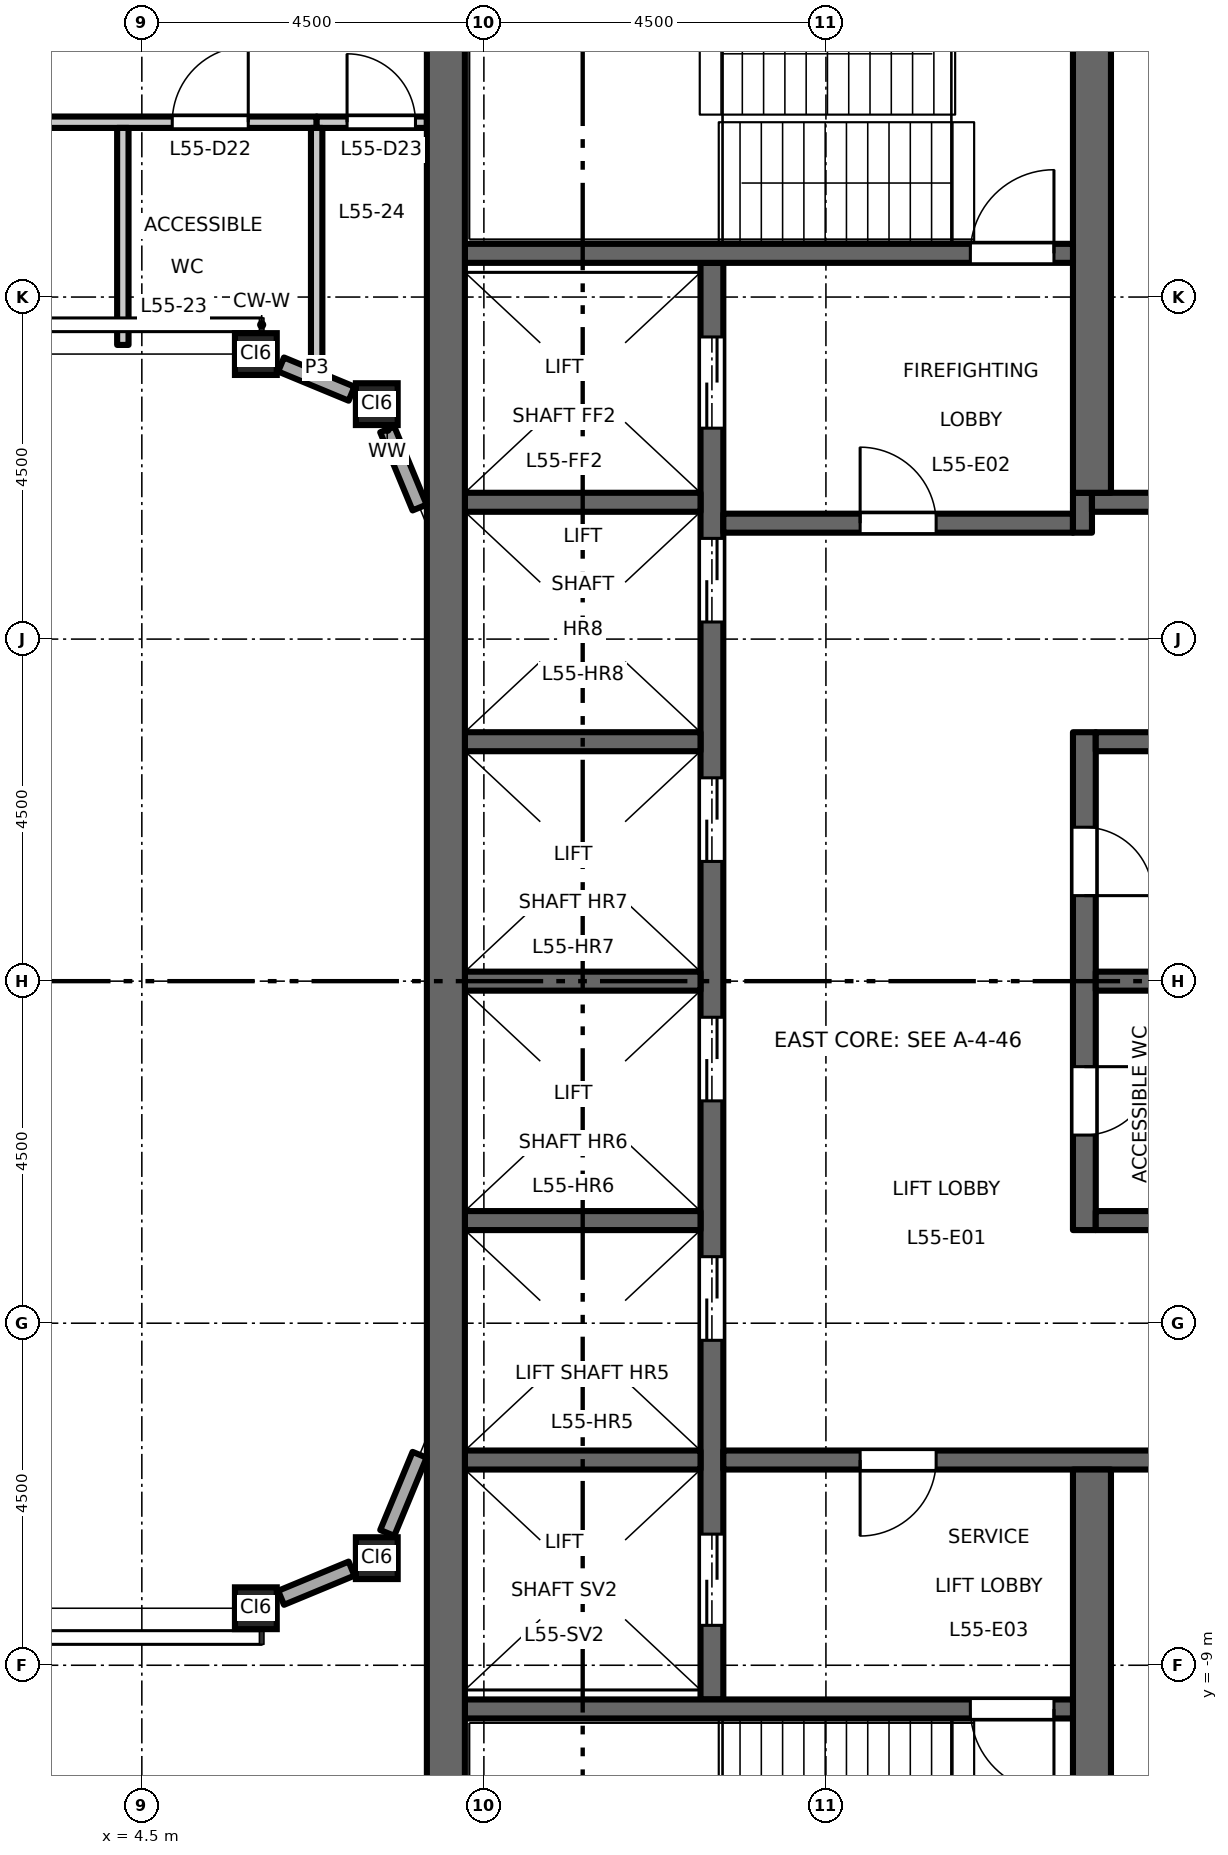
"""IFC4 building model, lengths in metres.
Left out: names, types, materials, properties, quantities, classifications, styles, units other than length and angle.
Written with IfcOpenShell. Run it as: python <this file> out.ifc"""

import sys

from ifc_helpers import new_model, si_unit, direction, frame, frame_2d, origin, origin_2d, place, context, subcontext, project, spatial, rectangle, hollow_rectangle, extrude, element, fill, save


model = new_model("IFC4")
c1 = context("Model", 3, precision=1e-05, world=origin(), true_north=direction((0.0, 1.0)))
c2 = subcontext(c1, "Body", "Model", "MODEL_VIEW")
j1 = project(units=[si_unit("LENGTHUNIT", "METRE"), si_unit("PLANEANGLEUNIT", "RADIAN")], contexts=[c1])
p1 = place(None, origin())
s1 = spatial("IfcSite", under=j1, at=p1, CompositionType="ELEMENT")
p2 = place(p1, origin())
s2 = spatial("IfcBuilding", under=s1, at=p2, CompositionType="ELEMENT")
p3 = place(p2, frame((0.0, 0.0, 255.7)))
s3 = spatial("IfcBuildingStorey", under=s2, at=p3, CompositionType="ELEMENT", Elevation=255.7)
for number, where, z_axis, x_axis in (
    (1, (6.0, -8.25, 0.0), (0.0, 0.0, 1.0), (1.0, 0.0, 0.0)),
    (2, (7.591, -7.591, 0.0), (0.0, 0.0, 1.0), (1.0, 0.0, 0.0)),
    (3, (6.0, 8.25, 0.0), (0.0, 0.0, 1.0), (1.0, 0.0, 0.0)),
    (4, (7.591, 7.591, 0.0), (0.0, 0.0, 1.0), (1.0, 0.0, 0.0)),
):
    element("IfcColumn", number, at=place(p3, frame(where, z_axis=z_axis, x_axis=x_axis)), inside=s3, PredefinedType="COLUMN", context=c2, shape_type="SweptSolid", body=[
        extrude(hollow_rectangle(XDim=0.55, YDim=0.55, WallThickness=0.028, at=origin_2d()), origin(), (0.0, 0.0, 1.0), 4.5),
    ])
p4 = place(p3, frame((12.0, -9.45, 0.0), z_axis=(0.0, 0.0, 1.0), x_axis=(0.0, 1.0, 0.0)))
e5 = element("IfcWall", 5, at=p4, inside=s3, PredefinedType="SHEAR", context=c2, shape_type="SweptSolid", body=[
    extrude(rectangle(XDim=18.9, YDim=0.3, at=frame_2d((9.45, 0.0))), origin(), (0.0, 0.0, 1.0), 4.35),
])
p5 = place(p4, frame((4.725, 0.0, 0.0)))
e6 = element("IfcOpeningElement", 6, at=p5, cuts=e5, PredefinedType="OPENING", context=c2, shape_type="SweptSolid", body=[
    extrude(rectangle(XDim=1.1, YDim=2.1, at=frame_2d((0.55, 1.05))), frame((0.0, 0.16, 0.0), z_axis=(0.0, -1.0, 0.0), x_axis=(1.0, 0.0, 0.0)), (0.0, 0.0, 1.0), 0.32),
])
p6 = place(p4, frame((7.875, 0.0, 0.0)))
e7 = element("IfcOpeningElement", 7, at=p6, cuts=e5, PredefinedType="OPENING", context=c2, shape_type="SweptSolid", body=[
    extrude(rectangle(XDim=1.1, YDim=2.1, at=frame_2d((0.55, 1.05))), frame((0.0, 0.16, 0.0), z_axis=(0.0, -1.0, 0.0), x_axis=(1.0, 0.0, 0.0)), (0.0, 0.0, 1.0), 0.32),
])
p7 = place(p4, frame((11.025, 0.0, 0.0)))
e8 = element("IfcOpeningElement", 8, at=p7, cuts=e5, PredefinedType="OPENING", context=c2, shape_type="SweptSolid", body=[
    extrude(rectangle(XDim=1.1, YDim=2.1, at=frame_2d((0.55, 1.05))), frame((0.0, 0.16, 0.0), z_axis=(0.0, -1.0, 0.0), x_axis=(1.0, 0.0, 0.0)), (0.0, 0.0, 1.0), 0.32),
])
p8 = place(p4, frame((14.175, 0.0, 0.0)))
e9 = element("IfcOpeningElement", 9, at=p8, cuts=e5, PredefinedType="OPENING", context=c2, shape_type="SweptSolid", body=[
    extrude(rectangle(XDim=1.1, YDim=2.1, at=frame_2d((0.55, 1.05))), frame((0.0, 0.16, 0.0), z_axis=(0.0, -1.0, 0.0), x_axis=(1.0, 0.0, 0.0)), (0.0, 0.0, 1.0), 0.32),
])
p9 = place(p4, frame((16.725, 0.0, 0.0)))
e10 = element("IfcOpeningElement", 10, at=p9, cuts=e5, PredefinedType="OPENING", context=c2, shape_type="SweptSolid", body=[
    extrude(rectangle(XDim=1.2, YDim=2.1, at=frame_2d((0.6, 1.05))), frame((0.0, 0.16, 0.0), z_axis=(0.0, -1.0, 0.0), x_axis=(1.0, 0.0, 0.0)), (0.0, 0.0, 1.0), 0.32),
])
p10 = place(p4, frame((0.975, 0.0, 0.0)))
e11 = element("IfcOpeningElement", 11, at=p10, cuts=e5, PredefinedType="OPENING", context=c2, shape_type="SweptSolid", body=[
    extrude(rectangle(XDim=1.2, YDim=2.1, at=frame_2d((0.6, 1.05))), frame((0.0, 0.16, 0.0), z_axis=(0.0, -1.0, 0.0), x_axis=(1.0, 0.0, 0.0)), (0.0, 0.0, 1.0), 0.32),
])
p11 = place(p3, frame((12.15, 6.025, 0.0), z_axis=(0.0, 0.0, 1.0), x_axis=(1.0, 0.0, 0.0)))
e12 = element("IfcWall", 12, at=p11, inside=s3, PredefinedType="SHEAR", context=c2, shape_type="SweptSolid", body=[
    extrude(rectangle(XDim=4.6, YDim=0.25, at=frame_2d((2.3, 0.0))), origin(), (0.0, 0.0, 1.0), 4.35),
])
p12 = place(p11, frame((1.8, 0.0, 0.0)))
e13 = element("IfcOpeningElement", 13, at=p12, cuts=e12, PredefinedType="OPENING", context=c2, shape_type="SweptSolid", body=[
    extrude(rectangle(XDim=1.0, YDim=2.1, at=frame_2d((0.5, 1.05))), frame((0.0, 0.135, 0.0), z_axis=(0.0, -1.0, 0.0), x_axis=(1.0, 0.0, 0.0)), (0.0, 0.0, 1.0), 0.27),
])
p13 = place(p3, frame((16.875, 5.9, 0.0), z_axis=(0.0, 0.0, 1.0), x_axis=(0.0, 1.0, 0.0)))
e14 = element("IfcWall", 14, at=p13, inside=s3, PredefinedType="SHEAR", context=c2, shape_type="SweptSolid", body=[
    extrude(rectangle(XDim=0.525, YDim=0.25, at=frame_2d((0.263, 0.0))), origin(), (0.0, 0.0, 1.0), 4.35),
])
p14 = place(p3, frame((17.0, 6.3, 0.0), z_axis=(0.0, 0.0, 1.0), x_axis=(1.0, 0.0, 0.0)))
e15 = element("IfcWall", 15, at=p14, inside=s3, PredefinedType="SHEAR", context=c2, shape_type="SweptSolid", body=[
    extrude(rectangle(XDim=4.25, YDim=0.25, at=frame_2d((2.125, 0.0))), origin(), (0.0, 0.0, 1.0), 4.35),
])
p15 = place(p3, frame((12.15, -6.3, 0.0), z_axis=(0.0, 0.0, 1.0), x_axis=(1.0, 0.0, 0.0)))
e16 = element("IfcWall", 16, at=p15, inside=s3, PredefinedType="SHEAR", context=c2, shape_type="SweptSolid", body=[
    extrude(rectangle(XDim=9.1, YDim=0.25, at=frame_2d((4.55, 0.0))), origin(), (0.0, 0.0, 1.0), 4.35),
])
p16 = place(p15, frame((1.8, 0.0, 0.0)))
e17 = element("IfcOpeningElement", 17, at=p16, cuts=e16, PredefinedType="OPENING", context=c2, shape_type="SweptSolid", body=[
    extrude(rectangle(XDim=1.0, YDim=2.1, at=frame_2d((0.5, 1.05))), frame((0.0, 0.135, 0.0), z_axis=(0.0, -1.0, 0.0), x_axis=(1.0, 0.0, 0.0)), (0.0, 0.0, 1.0), 0.27),
])
p17 = place(p3, frame((16.9, -3.275, 0.0), z_axis=(0.0, 0.0, 1.0), x_axis=(0.0, 1.0, 0.0)))
e18 = element("IfcWall", 18, at=p17, inside=s3, PredefinedType="SHEAR", context=c2, shape_type="SweptSolid", body=[
    extrude(rectangle(XDim=6.55, YDim=0.3, at=frame_2d((3.275, 0.0))), origin(), (0.0, 0.0, 1.0), 4.35),
])
p18 = place(p17, frame((1.25, 0.0, 0.0)))
e19 = element("IfcOpeningElement", 19, at=p18, cuts=e18, PredefinedType="OPENING", context=c2, shape_type="SweptSolid", body=[
    extrude(rectangle(XDim=0.9, YDim=2.1, at=frame_2d((0.45, 1.05))), frame((0.0, 0.16, 0.0), z_axis=(0.0, -1.0, 0.0), x_axis=(1.0, 0.0, 0.0)), (0.0, 0.0, 1.0), 0.32),
])
p19 = place(p17, frame((4.4, 0.0, 0.0)))
e20 = element("IfcOpeningElement", 20, at=p19, cuts=e18, PredefinedType="OPENING", context=c2, shape_type="SweptSolid", body=[
    extrude(rectangle(XDim=0.9, YDim=2.1, at=frame_2d((0.45, 1.05))), frame((0.0, 0.16, 0.0), z_axis=(0.0, -1.0, 0.0), x_axis=(1.0, 0.0, 0.0)), (0.0, 0.0, 1.0), 0.32),
])
for number, where, z_axis, x_axis in (
    (21, (17.05, 0.0, 0.0), (0.0, 0.0, 1.0), (1.0, 0.0, 0.0)),
    (22, (17.05, 3.15, 0.0), (0.0, 0.0, 1.0), (1.0, 0.0, 0.0)),
    (23, (17.05, -3.15, 0.0), (0.0, 0.0, 1.0), (1.0, 0.0, 0.0)),
):
    element("IfcWall", number, at=place(p3, frame(where, z_axis=z_axis, x_axis=x_axis)), inside=s3, PredefinedType="SHEAR", context=c2, shape_type="SweptSolid", body=[
        extrude(rectangle(XDim=4.2, YDim=0.25, at=frame_2d((2.1, 0.0))), origin(), (0.0, 0.0, 1.0), 4.35),
    ])
for number, where, z_axis, x_axis in (
    (24, (17.0, 6.425, 0.0), (0.0, 0.0, 1.0), (0.0, 1.0, 0.0)),
    (25, (17.0, -13.0, 0.0), (0.0, 0.0, 1.0), (0.0, 1.0, 0.0)),
):
    element("IfcWall", number, at=place(p3, frame(where, z_axis=z_axis, x_axis=x_axis)), inside=s3, PredefinedType="SHEAR", context=c2, shape_type="SweptSolid", body=[
        extrude(rectangle(XDim=6.575, YDim=0.5, at=frame_2d((3.288, 0.0))), origin(), (0.0, 0.0, 1.0), 4.35),
    ])
for number, where, z_axis, x_axis in (
    (26, (8.75, 0.0, 0.0), (0.0, 0.0, 1.0), (1.0, 0.0, 0.0)),
    (27, (8.75, 3.15, 0.0), (0.0, 0.0, 1.0), (1.0, 0.0, 0.0)),
    (28, (8.75, 6.3, 0.0), (0.0, 0.0, 1.0), (1.0, 0.0, 0.0)),
    (29, (8.75, -3.15, 0.0), (0.0, 0.0, 1.0), (1.0, 0.0, 0.0)),
    (30, (8.75, -6.3, 0.0), (0.0, 0.0, 1.0), (1.0, 0.0, 0.0)),
):
    element("IfcWall", number, at=place(p3, frame(where, z_axis=z_axis, x_axis=x_axis)), inside=s3, PredefinedType="SHEAR", context=c2, shape_type="SweptSolid", body=[
        extrude(rectangle(XDim=3.1, YDim=0.25, at=frame_2d((1.55, 0.0))), origin(), (0.0, 0.0, 1.0), 4.35),
    ])
p20 = place(p3, frame((8.75, 9.575, 0.0), z_axis=(0.0, 0.0, 1.0), x_axis=(1.0, 0.0, 0.0)))
e31 = element("IfcWall", 31, at=p20, inside=s3, PredefinedType="SHEAR", context=c2, shape_type="SweptSolid", body=[
    extrude(rectangle(XDim=8.0, YDim=0.25, at=frame_2d((4.0, 0.0))), origin(), (0.0, 0.0, 1.0), 4.35),
])
p21 = place(p20, frame((6.65, 0.0, 0.0)))
e32 = element("IfcOpeningElement", 32, at=p21, cuts=e31, PredefinedType="OPENING", context=c2, shape_type="SweptSolid", body=[
    extrude(rectangle(XDim=1.1, YDim=2.1, at=frame_2d((0.55, 1.05))), frame((0.0, 0.135, 0.0), z_axis=(0.0, -1.0, 0.0), x_axis=(1.0, 0.0, 0.0)), (0.0, 0.0, 1.0), 0.27),
])
p22 = place(p3, frame((8.75, -9.575, 0.0), z_axis=(0.0, 0.0, 1.0), x_axis=(1.0, 0.0, 0.0)))
e33 = element("IfcWall", 33, at=p22, inside=s3, PredefinedType="SHEAR", context=c2, shape_type="SweptSolid", body=[
    extrude(rectangle(XDim=8.0, YDim=0.25, at=frame_2d((4.0, 0.0))), origin(), (0.0, 0.0, 1.0), 4.35),
])
p23 = place(p22, frame((6.65, 0.0, 0.0)))
e34 = element("IfcOpeningElement", 34, at=p23, cuts=e33, PredefinedType="OPENING", context=c2, shape_type="SweptSolid", body=[
    extrude(rectangle(XDim=1.1, YDim=2.1, at=frame_2d((0.55, 1.05))), frame((0.0, 0.135, 0.0), z_axis=(0.0, -1.0, 0.0), x_axis=(1.0, 0.0, 0.0)), (0.0, 0.0, 1.0), 0.27),
])
p24 = place(p3, frame((8.5, -13.0, 0.0), z_axis=(0.0, 0.0, 1.0), x_axis=(0.0, 1.0, 0.0)))
e35 = element("IfcWall", 35, at=p24, inside=s3, PredefinedType="SHEAR", context=c2, shape_type="SweptSolid", body=[
    extrude(rectangle(XDim=26.0, YDim=0.5, at=frame_2d((13.0, 0.0))), origin(), (0.0, 0.0, 1.0), 4.35),
])
p25 = place(p3, frame((6.332, -8.113, 0.0), z_axis=(0.0, 0.0, 1.0), x_axis=(0.923859650767, 0.382731427616, 0.0)))
e36 = element("IfcWall", 36, at=p25, inside=s3, PredefinedType="STANDARD", context=c2, shape_type="SweptSolid", body=[
    extrude(rectangle(XDim=1.003, YDim=0.2, at=frame_2d((0.502, 0.0))), origin(), (0.0, 0.0, 1.0), 3.918),
])
for number, where, z_axis, x_axis in (
    (37, (7.729, -7.259, 0.0), (0.0, 0.0, 1.0), (0.383, 0.924, 0.0)),
    (38, (8.154, 6.231, 0.0), (0.0, 0.0, 1.0), (-0.383, 0.924, 0.0)),
):
    element("IfcWall", number, at=place(p3, frame(where, z_axis=z_axis, x_axis=x_axis)), inside=s3, PredefinedType="STANDARD", context=c2, shape_type="SweptSolid", body=[
        extrude(rectangle(XDim=1.113, YDim=0.2, at=frame_2d((0.556, 0.0))), origin(), (0.0, 0.0, 1.0), 3.918),
    ])
p26 = place(p3, frame((7.259, 7.729, 0.0), z_axis=(0.0, 0.0, 1.0), x_axis=(-0.923859650767, 0.382731427616, 0.0)))
e39 = element("IfcWall", 39, at=p26, inside=s3, PredefinedType="STANDARD", context=c2, shape_type="SweptSolid", body=[
    extrude(rectangle(XDim=1.003, YDim=0.2, at=frame_2d((0.502, 0.0))), origin(), (0.0, 0.0, 1.0), 3.918),
])
p27 = place(p3, frame((-8.25, 11.3, 0.0), z_axis=(0.0, 0.0, 1.0), x_axis=(1.0, 0.0, 0.0)))
e40 = element("IfcWall", 40, at=p27, inside=s3, PredefinedType="PARTITIONING", context=c2, shape_type="SweptSolid", body=[
    extrude(rectangle(XDim=15.05, YDim=0.15, at=frame_2d((7.525, 0.0))), origin(), (0.0, 0.0, 1.0), 4.35),
])
p28 = place(p27, frame((4.65, 0.0, 0.0)))
e41 = element("IfcOpeningElement", 41, at=p28, cuts=e40, PredefinedType="OPENING", context=c2, shape_type="SweptSolid", body=[
    extrude(rectangle(XDim=1.0, YDim=2.1, at=frame_2d((0.5, 1.05))), frame((0.0, 0.085, 0.0), z_axis=(0.0, -1.0, 0.0), x_axis=(1.0, 0.0, 0.0)), (0.0, 0.0, 1.0), 0.17),
])
p29 = place(p27, frame((6.9, 0.0, 0.0)))
e42 = element("IfcOpeningElement", 42, at=p29, cuts=e40, PredefinedType="OPENING", context=c2, shape_type="SweptSolid", body=[
    extrude(rectangle(XDim=1.0, YDim=2.1, at=frame_2d((0.5, 1.05))), frame((0.0, 0.085, 0.0), z_axis=(0.0, -1.0, 0.0), x_axis=(1.0, 0.0, 0.0)), (0.0, 0.0, 1.0), 0.17),
])
p30 = place(p27, frame((13.15, 0.0, 0.0)))
e43 = element("IfcOpeningElement", 43, at=p30, cuts=e40, PredefinedType="OPENING", context=c2, shape_type="SweptSolid", body=[
    extrude(rectangle(XDim=1.0, YDim=2.1, at=frame_2d((0.5, 1.05))), frame((0.0, 0.085, 0.0), z_axis=(0.0, -1.0, 0.0), x_axis=(1.0, 0.0, 0.0)), (0.0, 0.0, 1.0), 0.17),
])
p31 = place(p3, frame((6.8, 11.3, 0.0), z_axis=(0.0, 0.0, 1.0), x_axis=(1.0, 0.0, 0.0)))
e44 = element("IfcWall", 44, at=p31, inside=s3, PredefinedType="PARTITIONING", context=c2, shape_type="SweptSolid", body=[
    extrude(rectangle(XDim=1.45, YDim=0.15, at=frame_2d((0.725, 0.0))), origin(), (0.0, 0.0, 1.0), 4.35),
])
p32 = place(p31, frame((0.4, 0.0, 0.0)))
e45 = element("IfcOpeningElement", 45, at=p32, cuts=e44, PredefinedType="OPENING", context=c2, shape_type="SweptSolid", body=[
    extrude(rectangle(XDim=0.9, YDim=2.1, at=frame_2d((0.45, 1.05))), frame((0.0, 0.085, 0.0), z_axis=(0.0, -1.0, 0.0), x_axis=(1.0, 0.0, 0.0)), (0.0, 0.0, 1.0), 0.17),
])
p33 = place(p3, frame((4.25, 8.37, 0.0), z_axis=(0.0, 0.0, 1.0), x_axis=(0.0, 1.0, 0.0)))
e46 = element("IfcWall", 46, at=p33, inside=s3, PredefinedType="PARTITIONING", context=c2, shape_type="SweptSolid", body=[
    extrude(rectangle(XDim=2.855, YDim=0.15, at=frame_2d((1.427, 0.0))), origin(), (0.0, 0.0, 1.0), 4.35),
])
p34 = place(p3, frame((6.8, 8.069, 0.0), z_axis=(0.0, 0.0, 1.0), x_axis=(0.0, 1.0, 0.0)))
e47 = element("IfcWall", 47, at=p34, inside=s3, PredefinedType="PARTITIONING", context=c2, shape_type="SweptSolid", body=[
    extrude(rectangle(XDim=3.156, YDim=0.15, at=frame_2d((1.578, 0.0))), origin(), (0.0, 0.0, 1.0), 4.35),
])
p35 = place(p12, origin())
e48 = element("IfcDoor", 48, at=p35, inside=s3, OperationType="SINGLE_SWING_RIGHT", PredefinedType="DOOR", context=c2, shape_type="SweptSolid", body=[
    extrude(rectangle(XDim=1.0, YDim=2.1, at=frame_2d((0.5, 1.05))), frame((0.0, 0.025, 0.0), z_axis=(0.0, -1.0, 0.0), x_axis=(1.0, 0.0, 0.0)), (0.0, 0.0, 1.0), 0.05),
])
fill(e13, e48)
p36 = place(p16, origin())
e49 = element("IfcDoor", 49, at=p36, inside=s3, OperationType="SINGLE_SWING_LEFT", PredefinedType="DOOR", context=c2, shape_type="SweptSolid", body=[
    extrude(rectangle(XDim=1.0, YDim=2.1, at=frame_2d((0.5, 1.05))), frame((0.0, 0.025, 0.0), z_axis=(0.0, -1.0, 0.0), x_axis=(1.0, 0.0, 0.0)), (0.0, 0.0, 1.0), 0.05),
])
fill(e17, e49)
p37 = place(p21, origin())
e50 = element("IfcDoor", 50, at=p37, inside=s3, OperationType="SINGLE_SWING_LEFT", PredefinedType="DOOR", context=c2, shape_type="SweptSolid", body=[
    extrude(rectangle(XDim=1.1, YDim=2.1, at=frame_2d((0.55, 1.05))), frame((0.0, 0.025, 0.0), z_axis=(0.0, -1.0, 0.0), x_axis=(1.0, 0.0, 0.0)), (0.0, 0.0, 1.0), 0.05),
])
fill(e32, e50)
p38 = place(p23, origin())
e51 = element("IfcDoor", 51, at=p38, inside=s3, OperationType="SINGLE_SWING_RIGHT", PredefinedType="DOOR", context=c2, shape_type="SweptSolid", body=[
    extrude(rectangle(XDim=1.1, YDim=2.1, at=frame_2d((0.55, 1.05))), frame((0.0, 0.025, 0.0), z_axis=(0.0, -1.0, 0.0), x_axis=(1.0, 0.0, 0.0)), (0.0, 0.0, 1.0), 0.05),
])
fill(e34, e51)
p39 = place(p5, origin())
e52 = element("IfcDoor", 52, at=p39, inside=s3, OperationType="DOUBLE_DOOR_SLIDING", PredefinedType="DOOR", context=c2, shape_type="SweptSolid", body=[
    extrude(rectangle(XDim=1.1, YDim=2.1, at=frame_2d((0.55, 1.05))), frame((0.0, 0.025, 0.0), z_axis=(0.0, -1.0, 0.0), x_axis=(1.0, 0.0, 0.0)), (0.0, 0.0, 1.0), 0.05),
])
fill(e6, e52)
p40 = place(p6, origin())
e53 = element("IfcDoor", 53, at=p40, inside=s3, OperationType="DOUBLE_DOOR_SLIDING", PredefinedType="DOOR", context=c2, shape_type="SweptSolid", body=[
    extrude(rectangle(XDim=1.1, YDim=2.1, at=frame_2d((0.55, 1.05))), frame((0.0, 0.025, 0.0), z_axis=(0.0, -1.0, 0.0), x_axis=(1.0, 0.0, 0.0)), (0.0, 0.0, 1.0), 0.05),
])
fill(e7, e53)
p41 = place(p7, origin())
e54 = element("IfcDoor", 54, at=p41, inside=s3, OperationType="DOUBLE_DOOR_SLIDING", PredefinedType="DOOR", context=c2, shape_type="SweptSolid", body=[
    extrude(rectangle(XDim=1.1, YDim=2.1, at=frame_2d((0.55, 1.05))), frame((0.0, 0.025, 0.0), z_axis=(0.0, -1.0, 0.0), x_axis=(1.0, 0.0, 0.0)), (0.0, 0.0, 1.0), 0.05),
])
fill(e8, e54)
p42 = place(p8, origin())
e55 = element("IfcDoor", 55, at=p42, inside=s3, OperationType="DOUBLE_DOOR_SLIDING", PredefinedType="DOOR", context=c2, shape_type="SweptSolid", body=[
    extrude(rectangle(XDim=1.1, YDim=2.1, at=frame_2d((0.55, 1.05))), frame((0.0, 0.025, 0.0), z_axis=(0.0, -1.0, 0.0), x_axis=(1.0, 0.0, 0.0)), (0.0, 0.0, 1.0), 0.05),
])
fill(e9, e55)
p43 = place(p9, origin())
e56 = element("IfcDoor", 56, at=p43, inside=s3, OperationType="DOUBLE_DOOR_SLIDING", PredefinedType="DOOR", context=c2, shape_type="SweptSolid", body=[
    extrude(rectangle(XDim=1.2, YDim=2.1, at=frame_2d((0.6, 1.05))), frame((0.0, 0.025, 0.0), z_axis=(0.0, -1.0, 0.0), x_axis=(1.0, 0.0, 0.0)), (0.0, 0.0, 1.0), 0.05),
])
fill(e10, e56)
p44 = place(p10, origin())
e57 = element("IfcDoor", 57, at=p44, inside=s3, OperationType="DOUBLE_DOOR_SLIDING", PredefinedType="DOOR", context=c2, shape_type="SweptSolid", body=[
    extrude(rectangle(XDim=1.2, YDim=2.1, at=frame_2d((0.6, 1.05))), frame((0.0, 0.025, 0.0), z_axis=(0.0, -1.0, 0.0), x_axis=(1.0, 0.0, 0.0)), (0.0, 0.0, 1.0), 0.05),
])
fill(e11, e57)
p45 = place(p18, origin())
e58 = element("IfcDoor", 58, at=p45, inside=s3, OperationType="SINGLE_SWING_RIGHT", PredefinedType="DOOR", context=c2, shape_type="SweptSolid", body=[
    extrude(rectangle(XDim=0.9, YDim=2.1, at=frame_2d((0.45, 1.05))), frame((0.0, 0.025, 0.0), z_axis=(0.0, -1.0, 0.0), x_axis=(1.0, 0.0, 0.0)), (0.0, 0.0, 1.0), 0.05),
])
fill(e19, e58)
p46 = place(p19, origin())
e59 = element("IfcDoor", 59, at=p46, inside=s3, OperationType="SINGLE_SWING_LEFT", PredefinedType="DOOR", context=c2, shape_type="SweptSolid", body=[
    extrude(rectangle(XDim=0.9, YDim=2.1, at=frame_2d((0.45, 1.05))), frame((0.0, 0.025, 0.0), z_axis=(0.0, -1.0, 0.0), x_axis=(1.0, 0.0, 0.0)), (0.0, 0.0, 1.0), 0.05),
])
fill(e20, e59)
p47 = place(p30, origin())
e60 = element("IfcDoor", 60, at=p47, inside=s3, OperationType="SINGLE_SWING_RIGHT", PredefinedType="DOOR", context=c2, shape_type="SweptSolid", body=[
    extrude(rectangle(XDim=1.0, YDim=2.1, at=frame_2d((0.5, 1.05))), frame((0.0, 0.025, 0.0), z_axis=(0.0, -1.0, 0.0), x_axis=(1.0, 0.0, 0.0)), (0.0, 0.0, 1.0), 0.05),
])
fill(e43, e60)
p48 = place(p32, origin())
e61 = element("IfcDoor", 61, at=p48, inside=s3, OperationType="SINGLE_SWING_LEFT", PredefinedType="DOOR", context=c2, shape_type="SweptSolid", body=[
    extrude(rectangle(XDim=0.9, YDim=2.1, at=frame_2d((0.45, 1.05))), frame((0.0, 0.025, 0.0), z_axis=(0.0, -1.0, 0.0), x_axis=(1.0, 0.0, 0.0)), (0.0, 0.0, 1.0), 0.05),
])
fill(e45, e61)
save(model, sys.argv[1])
